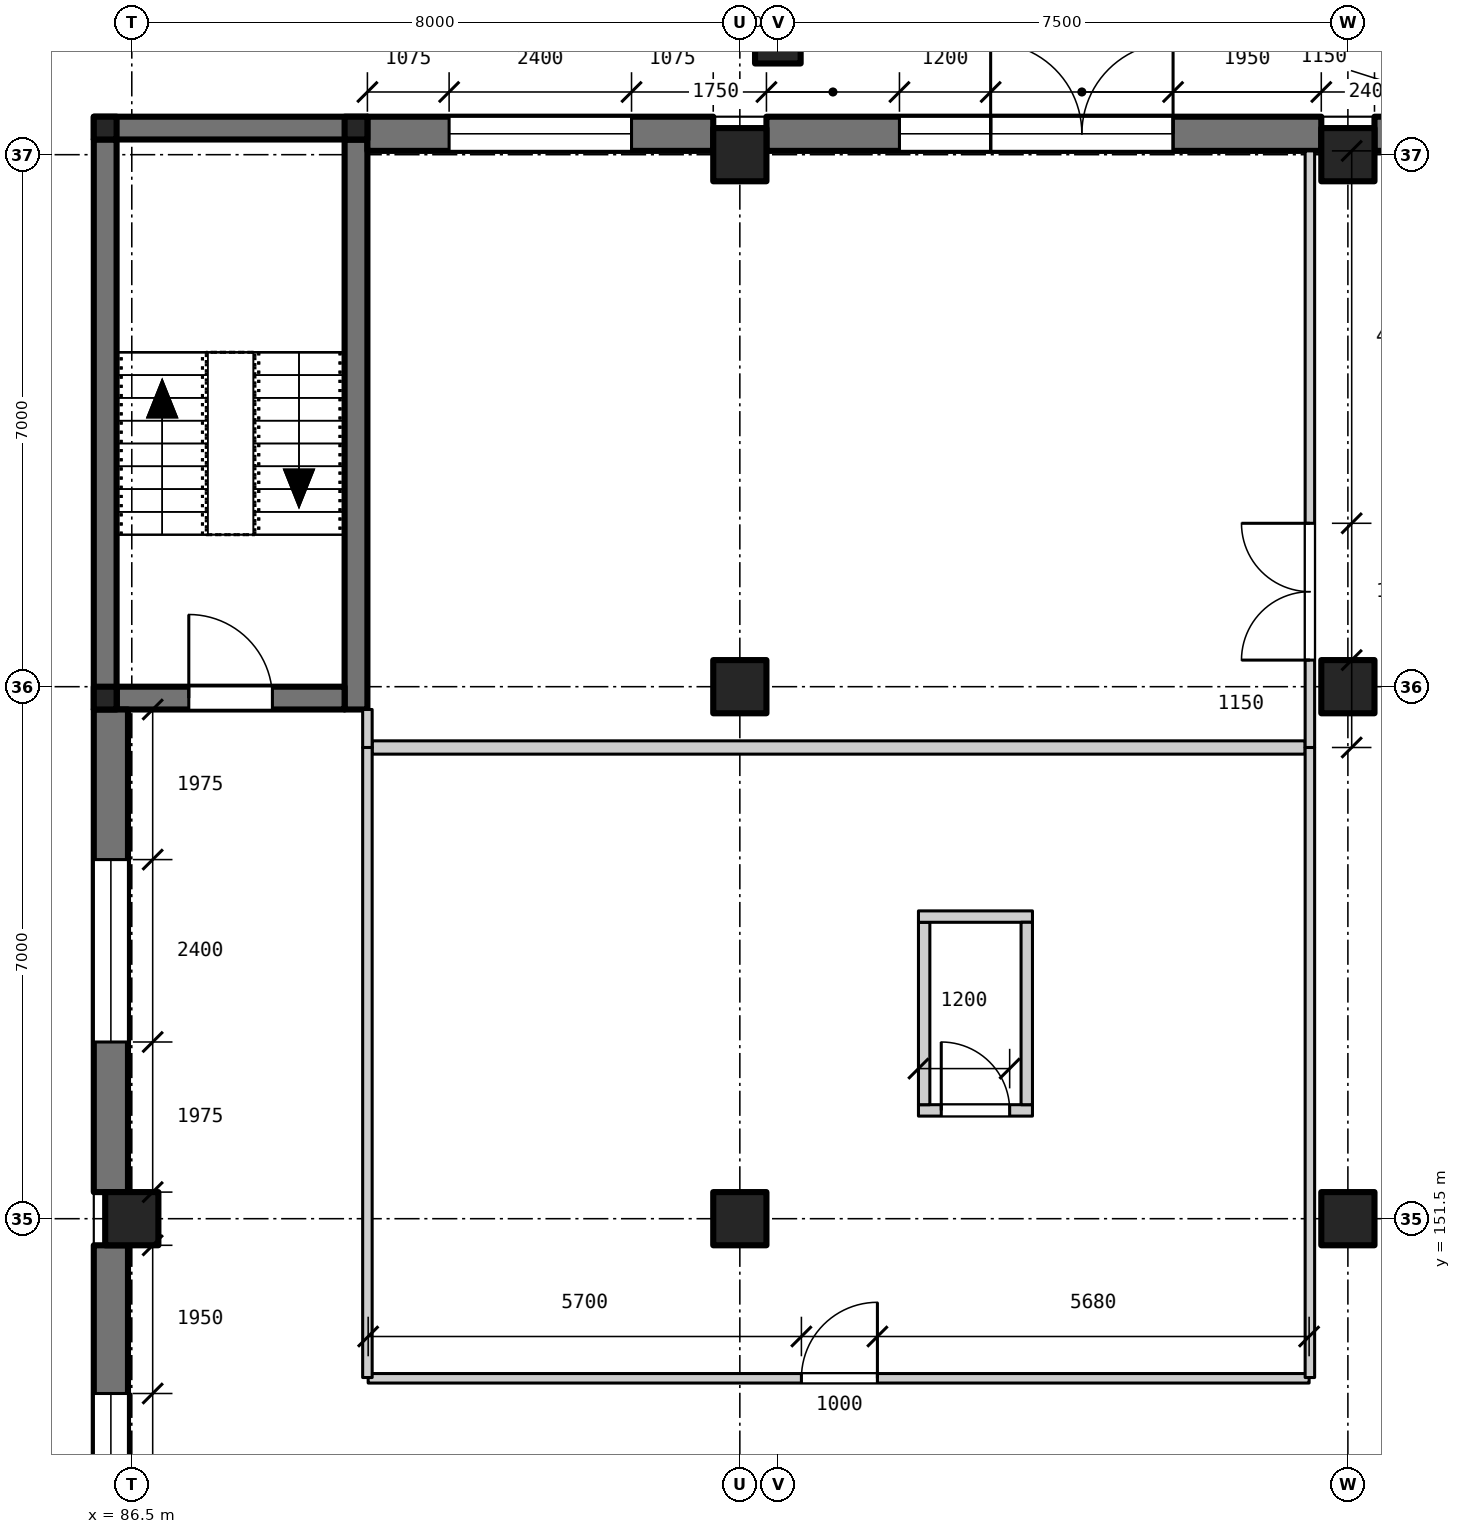
"""IFC4 building model, lengths in metres.
Left out: names, types, materials, properties, quantities, classifications, styles, units other than length and angle.
Written with IfcOpenShell. Run it as: python <this file> out.ifc"""

import sys

from ifc_helpers import new_model, si_unit, direction, frame, frame_2d, origin, origin_2d, place, context, subcontext, project, spatial, rectangle, extrude, element, fill, save


model = new_model("IFC4")
c1 = context("Model", 3, precision=1e-05, world=origin(), true_north=direction((0.0, 1.0)))
c2 = subcontext(c1, "Body", "Model", "MODEL_VIEW")
j1 = project(units=[si_unit("LENGTHUNIT", "METRE"), si_unit("PLANEANGLEUNIT", "RADIAN")], contexts=[c1])
p1 = place(None, origin())
s1 = spatial("IfcSite", under=j1, at=p1, CompositionType="ELEMENT")
p2 = place(p1, origin())
s2 = spatial("IfcBuilding", under=s1, at=p2, CompositionType="ELEMENT")
p3 = place(p2, origin())
s3 = spatial("IfcBuildingStorey", under=s2, at=p3, CompositionType="ELEMENT", Elevation=0.0)
for number, where, z_axis, x_axis in (
    (1, (86.5, 151.5, -1.4), (0.0, 0.0, 1.0), (1.0, 0.0, 0.0)),
    (2, (94.5, 151.5, -1.4), (0.0, 0.0, 1.0), (1.0, 0.0, 0.0)),
    (3, (94.5, 158.5, -1.4), (0.0, 0.0, 1.0), (1.0, 0.0, 0.0)),
    (4, (94.5, 165.5, -1.4), (0.0, 0.0, 1.0), (1.0, 0.0, 0.0)),
    (5, (102.5, 151.5, -1.4), (0.0, 0.0, 1.0), (1.0, 0.0, 0.0)),
    (6, (102.5, 158.5, -1.4), (0.0, 0.0, 1.0), (1.0, 0.0, 0.0)),
    (7, (102.5, 165.5, -1.4), (0.0, 0.0, 1.0), (1.0, 0.0, 0.0)),
):
    element("IfcColumn", number, at=place(p3, frame(where, z_axis=z_axis, x_axis=x_axis)), inside=s3, PredefinedType="COLUMN", context=c2, shape_type="SweptSolid", body=[
        extrude(rectangle(XDim=0.7, YDim=0.7, at=origin_2d()), origin(), (0.0, 0.0, 1.0), 7.4),
    ])
for number, where, z_axis, x_axis in (
    (8, (86.15, 158.35, -1.4), (0.0, 0.0, 1.0), (1.0, 0.0, 0.0)),
    (9, (86.15, 165.85, -1.4), (0.0, 0.0, 1.0), (1.0, 0.0, 0.0)),
    (10, (89.45, 165.85, -1.4), (0.0, 0.0, 1.0), (1.0, 0.0, 0.0)),
):
    element("IfcColumn", number, at=place(p3, frame(where, z_axis=z_axis, x_axis=x_axis)), inside=s3, PredefinedType="COLUMN", context=c2, shape_type="SweptSolid", body=[
        extrude(rectangle(XDim=0.3, YDim=0.3, at=origin_2d()), origin(), (0.0, 0.0, 1.0), 1.1),
    ])
p4 = place(p3, frame((95.0, 167.0, -0.3), z_axis=(0.0, 0.0, 1.0), x_axis=(1.0, 0.0, 0.0)))
e11 = element("IfcColumn", 11, at=p4, inside=s3, PredefinedType="COLUMN", context=c2, shape_type="SweptSolid", body=[
    extrude(rectangle(XDim=0.6, YDim=0.6, at=origin_2d()), origin(), (0.0, 0.0, 1.0), 6.15),
])
p5 = place(p3, frame((89.45, 158.2, -1.4), z_axis=(0.0, 0.0, 1.0), x_axis=(0.0, 1.0, 0.0)))
e12 = element("IfcWall", 12, at=p5, inside=s3, PredefinedType="SHEAR", context=c2, shape_type="SweptSolid", body=[
    extrude(rectangle(XDim=7.5, YDim=0.3, at=frame_2d((3.75, 0.0))), origin(), (0.0, 0.0, 1.0), 7.4),
])
p6 = place(p3, frame((86.3, 158.35, -1.4), z_axis=(0.0, 0.0, 1.0), x_axis=(1.0, 0.0, 0.0)))
e13 = element("IfcWall", 13, at=p6, inside=s3, PredefinedType="SHEAR", context=c2, shape_type="SweptSolid", body=[
    extrude(rectangle(XDim=3.0, YDim=0.3, at=frame_2d((1.5, 0.0))), origin(), (0.0, 0.0, 1.0), 7.4),
])
p7 = place(p6, frame((0.95, 0.0, 1.4)))
e14 = element("IfcOpeningElement", 14, at=p7, cuts=e13, PredefinedType="OPENING", context=c2, shape_type="SweptSolid", body=[
    extrude(rectangle(XDim=1.1, YDim=2.1, at=frame_2d((0.55, 1.05))), frame((0.0, 0.16, 0.0), z_axis=(0.0, -1.0, 0.0), x_axis=(1.0, 0.0, 0.0)), (0.0, 0.0, 1.0), 0.32),
])
p8 = place(p3, frame((86.0, 165.85, 0.0), z_axis=(0.0, 0.0, 1.0), x_axis=(1.0, 0.0, 0.0)))
e15 = element("IfcWall", 15, at=p8, inside=s3, PredefinedType="SOLIDWALL", context=c2, shape_type="SweptSolid", body=[
    extrude(rectangle(XDim=3.6, YDim=0.3, at=frame_2d((1.8, 0.0))), origin(), (0.0, 0.0, 1.0), 5.7),
])
p9 = place(p3, frame((89.6, 165.775, 0.0), z_axis=(0.0, 0.0, 1.0), x_axis=(1.0, 0.0, 0.0)))
e16 = element("IfcWall", 16, at=p9, inside=s3, PredefinedType="SOLIDWALL", context=c2, shape_type="SweptSolid", body=[
    extrude(rectangle(XDim=4.55, YDim=0.45, at=frame_2d((2.275, 0.0))), origin(), (0.0, 0.0, 1.0), 4.9),
])
p10 = place(p9, frame((1.075, 0.0, 0.9)))
e17 = element("IfcOpeningElement", 17, at=p10, cuts=e16, PredefinedType="OPENING", context=c2, shape_type="SweptSolid", body=[
    extrude(rectangle(XDim=2.4, YDim=1.6, at=frame_2d((1.2, 0.8))), frame((0.0, 0.235, 0.0), z_axis=(0.0, -1.0, 0.0), x_axis=(1.0, 0.0, 0.0)), (0.0, 0.0, 1.0), 0.47),
])
p11 = place(p3, frame((94.85, 165.775, 0.0), z_axis=(0.0, 0.0, 1.0), x_axis=(1.0, 0.0, 0.0)))
e18 = element("IfcWall", 18, at=p11, inside=s3, PredefinedType="SOLIDWALL", context=c2, shape_type="SweptSolid", body=[
    extrude(rectangle(XDim=7.3, YDim=0.45, at=frame_2d((3.65, 0.0))), origin(), (0.0, 0.0, 1.0), 4.9),
])
p12 = place(p11, frame((2.95, 0.0, 0.0)))
e19 = element("IfcOpeningElement", 19, at=p12, cuts=e18, PredefinedType="OPENING", context=c2, shape_type="SweptSolid", body=[
    extrude(rectangle(XDim=2.4, YDim=2.4, at=frame_2d((1.2, 1.2))), frame((0.0, 0.235, 0.0), z_axis=(0.0, -1.0, 0.0), x_axis=(1.0, 0.0, 0.0)), (0.0, 0.0, 1.0), 0.47),
])
p13 = place(p11, frame((2.95, 0.0, 2.5)))
e20 = element("IfcOpeningElement", 20, at=p13, cuts=e18, PredefinedType="OPENING", context=c2, shape_type="SweptSolid", body=[
    extrude(rectangle(XDim=2.4, YDim=0.6, at=frame_2d((1.2, 0.3))), frame((0.0, 0.235, 0.0), z_axis=(0.0, -1.0, 0.0), x_axis=(1.0, 0.0, 0.0)), (0.0, 0.0, 1.0), 0.47),
])
p14 = place(p11, frame((1.75, 0.0, 0.4)))
e21 = element("IfcOpeningElement", 21, at=p14, cuts=e18, PredefinedType="OPENING", context=c2, shape_type="SweptSolid", body=[
    extrude(rectangle(XDim=1.2, YDim=3.0, at=frame_2d((0.6, 1.5))), frame((0.0, 0.235, 0.0), z_axis=(0.0, -1.0, 0.0), x_axis=(1.0, 0.0, 0.0)), (0.0, 0.0, 1.0), 0.47),
])
p15 = place(p3, frame((102.85, 165.775, 0.0), z_axis=(0.0, 0.0, 1.0), x_axis=(1.0, 0.0, 0.0)))
e22 = element("IfcWall", 22, at=p15, inside=s3, PredefinedType="SOLIDWALL", context=c2, shape_type="SweptSolid", body=[
    extrude(rectangle(XDim=7.3, YDim=0.45, at=frame_2d((3.65, 0.0))), origin(), (0.0, 0.0, 1.0), 4.9),
])
p16 = place(p15, frame((4.525, 0.0, 0.0)))
e23 = element("IfcOpeningElement", 23, at=p16, cuts=e22, PredefinedType="OPENING", context=c2, shape_type="SweptSolid", body=[
    extrude(rectangle(XDim=2.4, YDim=2.4, at=frame_2d((1.2, 1.2))), frame((0.0, 0.235, 0.0), z_axis=(0.0, -1.0, 0.0), x_axis=(1.0, 0.0, 0.0)), (0.0, 0.0, 1.0), 0.47),
])
p17 = place(p15, frame((4.525, 0.0, 2.5)))
e24 = element("IfcOpeningElement", 24, at=p17, cuts=e22, PredefinedType="OPENING", context=c2, shape_type="SweptSolid", body=[
    extrude(rectangle(XDim=2.4, YDim=0.6, at=frame_2d((1.2, 0.3))), frame((0.0, 0.235, 0.0), z_axis=(0.0, -1.0, 0.0), x_axis=(1.0, 0.0, 0.0)), (0.0, 0.0, 1.0), 0.47),
])
p18 = place(p15, frame((3.325, 0.0, 0.4)))
e25 = element("IfcOpeningElement", 25, at=p18, cuts=e22, PredefinedType="OPENING", context=c2, shape_type="SweptSolid", body=[
    extrude(rectangle(XDim=1.2, YDim=3.0, at=frame_2d((0.6, 1.5))), frame((0.0, 0.235, 0.0), z_axis=(0.0, -1.0, 0.0), x_axis=(1.0, 0.0, 0.0)), (0.0, 0.0, 1.0), 0.47),
])
p19 = place(p3, frame((86.15, 158.2, 0.0), z_axis=(0.0, 0.0, 1.0), x_axis=(0.0, 1.0, 0.0)))
e26 = element("IfcWall", 26, at=p19, inside=s3, PredefinedType="SOLIDWALL", context=c2, shape_type="SweptSolid", body=[
    extrude(rectangle(XDim=7.5, YDim=0.3, at=frame_2d((3.75, 0.0))), origin(), (0.0, 0.0, 1.0), 5.7),
])
p20 = place(p3, frame((86.225, 144.85, 0.0), z_axis=(0.0, 0.0, 1.0), x_axis=(0.0, 1.0, 0.0)))
e27 = element("IfcWall", 27, at=p20, inside=s3, PredefinedType="SOLIDWALL", context=c2, shape_type="SweptSolid", body=[
    extrude(rectangle(XDim=6.3, YDim=0.45, at=frame_2d((3.15, 0.0))), origin(), (0.0, 0.0, 1.0), 5.0),
])
p21 = place(p20, frame((1.95, 0.0, 0.9)))
e28 = element("IfcOpeningElement", 28, at=p21, cuts=e27, PredefinedType="OPENING", context=c2, shape_type="SweptSolid", body=[
    extrude(rectangle(XDim=2.4, YDim=1.6, at=frame_2d((1.2, 0.8))), frame((0.0, 0.235, 0.0), z_axis=(0.0, -1.0, 0.0), x_axis=(1.0, 0.0, 0.0)), (0.0, 0.0, 1.0), 0.47),
])
p22 = place(p3, frame((86.225, 151.85, 0.0), z_axis=(0.0, 0.0, 1.0), x_axis=(0.0, 1.0, 0.0)))
e29 = element("IfcWall", 29, at=p22, inside=s3, PredefinedType="SOLIDWALL", context=c2, shape_type="SweptSolid", body=[
    extrude(rectangle(XDim=6.35, YDim=0.45, at=frame_2d((3.175, 0.0))), origin(), (0.0, 0.0, 1.0), 5.0),
])
p23 = place(p22, frame((1.975, 0.0, 0.9)))
e30 = element("IfcOpeningElement", 30, at=p23, cuts=e29, PredefinedType="OPENING", context=c2, shape_type="SweptSolid", body=[
    extrude(rectangle(XDim=2.4, YDim=1.6, at=frame_2d((1.2, 0.8))), frame((0.0, 0.235, 0.0), z_axis=(0.0, -1.0, 0.0), x_axis=(1.0, 0.0, 0.0)), (0.0, 0.0, 1.0), 0.47),
])
p24 = place(p3, frame((96.85, 152.925, 0.0), z_axis=(0.0, 0.0, 1.0), x_axis=(1.0, 0.0, 0.0)))
e31 = element("IfcWall", 31, at=p24, inside=s3, PredefinedType="PARTITIONING", context=c2, shape_type="SweptSolid", body=[
    extrude(rectangle(XDim=1.5, YDim=0.15, at=frame_2d((0.75, 0.0))), origin(), (0.0, 0.0, 1.0), 5.7),
])
p25 = place(p24, frame((0.3, 0.0, 0.0)))
e32 = element("IfcOpeningElement", 32, at=p25, cuts=e31, PredefinedType="OPENING", context=c2, shape_type="SweptSolid", body=[
    extrude(rectangle(XDim=0.9, YDim=2.1, at=frame_2d((0.45, 1.05))), frame((0.0, 0.085, 0.0), z_axis=(0.0, -1.0, 0.0), x_axis=(1.0, 0.0, 0.0)), (0.0, 0.0, 1.0), 0.17),
])
p26 = place(p3, frame((96.925, 153.0, 0.0), z_axis=(0.0, 0.0, 1.0), x_axis=(0.0, 1.0, 0.0)))
e33 = element("IfcWall", 33, at=p26, inside=s3, PredefinedType="PARTITIONING", context=c2, shape_type="SweptSolid", body=[
    extrude(rectangle(XDim=2.4, YDim=0.15, at=frame_2d((1.2, 0.0))), origin(), (0.0, 0.0, 1.0), 5.7),
])
p27 = place(p3, frame((96.85, 155.475, 0.0), z_axis=(0.0, 0.0, 1.0), x_axis=(1.0, 0.0, 0.0)))
e34 = element("IfcWall", 34, at=p27, inside=s3, PredefinedType="PARTITIONING", context=c2, shape_type="SweptSolid", body=[
    extrude(rectangle(XDim=1.5, YDim=0.15, at=frame_2d((0.75, 0.0))), origin(), (0.0, 0.0, 1.0), 5.7),
])
p28 = place(p3, frame((98.275, 153.0, 0.0), z_axis=(0.0, 0.0, 1.0), x_axis=(0.0, 1.0, 0.0)))
e35 = element("IfcWall", 35, at=p28, inside=s3, PredefinedType="PARTITIONING", context=c2, shape_type="SweptSolid", body=[
    extrude(rectangle(XDim=2.4, YDim=0.15, at=frame_2d((1.2, 0.0))), origin(), (0.0, 0.0, 1.0), 5.7),
])
p29 = place(p3, frame((89.61, 149.4, 0.0), z_axis=(0.0, 0.0, 1.0), x_axis=(1.0, 0.0, 0.0)))
e36 = element("IfcWall", 36, at=p29, inside=s3, PredefinedType="PARTITIONING", context=c2, shape_type="SweptSolid", body=[
    extrude(rectangle(XDim=12.38, YDim=0.125, at=frame_2d((6.19, 0.0))), origin(), (0.0, 0.0, 1.0), 5.7),
])
p30 = place(p29, frame((5.7, 0.0, 0.0)))
e37 = element("IfcOpeningElement", 37, at=p30, cuts=e36, PredefinedType="OPENING", context=c2, shape_type="SweptSolid", body=[
    extrude(rectangle(XDim=1.0, YDim=2.1, at=frame_2d((0.5, 1.05))), frame((0.0, 0.073, 0.0), z_axis=(0.0, -1.0, 0.0), x_axis=(1.0, 0.0, 0.0)), (0.0, 0.0, 1.0), 0.145),
])
p31 = place(p3, frame((89.663, 157.7, 0.0), z_axis=(0.0, 0.0, 1.0), x_axis=(1.0, 0.0, 0.0)))
e38 = element("IfcWall", 38, at=p31, inside=s3, PredefinedType="PARTITIONING", context=c2, shape_type="SweptSolid", body=[
    extrude(rectangle(XDim=12.275, YDim=0.175, at=frame_2d((6.137, 0.0))), origin(), (0.0, 0.0, 1.0), 5.7),
])
p32 = place(p3, frame((89.6, 149.41, 0.0), z_axis=(0.0, 0.0, 1.0), x_axis=(0.0, 1.0, 0.0)))
e39 = element("IfcWall", 39, at=p32, inside=s3, PredefinedType="PARTITIONING", context=c2, shape_type="SweptSolid", body=[
    extrude(rectangle(XDim=8.29, YDim=0.125, at=frame_2d((4.145, 0.0))), origin(), (0.0, 0.0, 1.0), 5.7),
])
p33 = place(p3, frame((89.6, 157.7, 0.0), z_axis=(0.0, 0.0, 1.0), x_axis=(0.0, 1.0, 0.0)))
e40 = element("IfcWall", 40, at=p33, inside=s3, PredefinedType="PARTITIONING", context=c2, shape_type="SweptSolid", body=[
    extrude(rectangle(XDim=0.5, YDim=0.125, at=frame_2d((0.25, 0.0))), origin(), (0.0, 0.0, 1.0), 5.7),
])
p34 = place(p3, frame((102.0, 149.41, 0.0), z_axis=(0.0, 0.0, 1.0), x_axis=(0.0, 1.0, 0.0)))
e41 = element("IfcWall", 41, at=p34, inside=s3, PredefinedType="PARTITIONING", context=c2, shape_type="SweptSolid", body=[
    extrude(rectangle(XDim=8.29, YDim=0.125, at=frame_2d((4.145, 0.0))), origin(), (0.0, 0.0, 1.0), 5.7),
])
p35 = place(p3, frame((102.0, 157.7, 0.0), z_axis=(0.0, 0.0, 1.0), x_axis=(0.0, 1.0, 0.0)))
e42 = element("IfcWall", 42, at=p35, inside=s3, PredefinedType="PARTITIONING", context=c2, shape_type="SweptSolid", body=[
    extrude(rectangle(XDim=7.85, YDim=0.125, at=frame_2d((3.925, 0.0))), origin(), (0.0, 0.0, 1.0), 5.7),
])
p36 = place(p35, frame((1.15, 0.0, 0.0)))
e43 = element("IfcOpeningElement", 43, at=p36, cuts=e42, PredefinedType="OPENING", context=c2, shape_type="SweptSolid", body=[
    extrude(rectangle(XDim=1.8, YDim=2.1, at=frame_2d((0.9, 1.05))), frame((0.0, 0.073, 0.0), z_axis=(0.0, -1.0, 0.0), x_axis=(1.0, 0.0, 0.0)), (0.0, 0.0, 1.0), 0.145),
])
p37 = place(p10, origin())
e44 = element("IfcWindow", 44, at=p37, inside=s3, PartitioningType="SINGLE_PANEL", PredefinedType="WINDOW", context=c2, shape_type="SweptSolid", body=[
    extrude(rectangle(XDim=2.4, YDim=1.6, at=frame_2d((1.2, 0.8))), frame((0.0, -0.125, 0.0), z_axis=(0.0, -1.0, 0.0), x_axis=(1.0, 0.0, 0.0)), (0.0, 0.0, 1.0), 0.06),
])
fill(e17, e44)
p38 = place(p12, origin())
e45 = element("IfcDoor", 45, at=p38, inside=s3, OperationType="DOUBLE_DOOR_DOUBLE_SWING", PredefinedType="DOOR", context=c2, shape_type="SweptSolid", body=[
    extrude(rectangle(XDim=2.4, YDim=2.4, at=frame_2d((1.2, 1.2))), frame((0.0, 0.025, 0.0), z_axis=(0.0, -1.0, 0.0), x_axis=(1.0, 0.0, 0.0)), (0.0, 0.0, 1.0), 0.05),
])
fill(e19, e45)
p39 = place(p13, origin())
e46 = element("IfcWindow", 46, at=p39, inside=s3, PartitioningType="SINGLE_PANEL", PredefinedType="WINDOW", context=c2, shape_type="SweptSolid", body=[
    extrude(rectangle(XDim=2.4, YDim=0.6, at=frame_2d((1.2, 0.3))), frame((0.0, 0.025, 0.0), z_axis=(0.0, -1.0, 0.0), x_axis=(1.0, 0.0, 0.0)), (0.0, 0.0, 1.0), 0.06),
])
fill(e20, e46)
p40 = place(p14, origin())
e47 = element("IfcWindow", 47, at=p40, inside=s3, PartitioningType="SINGLE_PANEL", PredefinedType="WINDOW", context=c2, shape_type="SweptSolid", body=[
    extrude(rectangle(XDim=1.2, YDim=3.0, at=frame_2d((0.6, 1.5))), frame((0.0, 0.025, 0.0), z_axis=(0.0, -1.0, 0.0), x_axis=(1.0, 0.0, 0.0)), (0.0, 0.0, 1.0), 0.06),
])
fill(e21, e47)
p41 = place(p21, origin())
e48 = element("IfcWindow", 48, at=p41, inside=s3, PartitioningType="SINGLE_PANEL", PredefinedType="WINDOW", context=c2, shape_type="SweptSolid", body=[
    extrude(rectangle(XDim=2.4, YDim=1.6, at=frame_2d((1.2, 0.8))), frame((0.0, -0.125, 0.0), z_axis=(0.0, -1.0, 0.0), x_axis=(1.0, 0.0, 0.0)), (0.0, 0.0, 1.0), 0.06),
])
fill(e28, e48)
p42 = place(p23, origin())
e49 = element("IfcWindow", 49, at=p42, inside=s3, PartitioningType="SINGLE_PANEL", PredefinedType="WINDOW", context=c2, shape_type="SweptSolid", body=[
    extrude(rectangle(XDim=2.4, YDim=1.6, at=frame_2d((1.2, 0.8))), frame((0.0, -0.125, 0.0), z_axis=(0.0, -1.0, 0.0), x_axis=(1.0, 0.0, 0.0)), (0.0, 0.0, 1.0), 0.06),
])
fill(e30, e49)
p43 = place(p30, origin())
e50 = element("IfcDoor", 50, at=p43, inside=s3, OperationType="SINGLE_SWING_RIGHT", PredefinedType="DOOR", context=c2, shape_type="SweptSolid", body=[
    extrude(rectangle(XDim=1.0, YDim=2.1, at=frame_2d((0.5, 1.05))), frame((0.0, 0.025, 0.0), z_axis=(0.0, -1.0, 0.0), x_axis=(1.0, 0.0, 0.0)), (0.0, 0.0, 1.0), 0.05),
])
fill(e37, e50)
p44 = place(p25, origin())
e51 = element("IfcDoor", 51, at=p44, inside=s3, OperationType="SINGLE_SWING_LEFT", PredefinedType="DOOR", context=c2, shape_type="SweptSolid", body=[
    extrude(rectangle(XDim=0.9, YDim=2.1, at=frame_2d((0.45, 1.05))), frame((0.0, 0.025, 0.0), z_axis=(0.0, -1.0, 0.0), x_axis=(1.0, 0.0, 0.0)), (0.0, 0.0, 1.0), 0.05),
])
fill(e32, e51)
p45 = place(p36, origin())
e52 = element("IfcDoor", 52, at=p45, inside=s3, OperationType="DOUBLE_DOOR_SINGLE_SWING", PredefinedType="DOOR", context=c2, shape_type="SweptSolid", body=[
    extrude(rectangle(XDim=1.8, YDim=2.1, at=frame_2d((0.9, 1.05))), frame((0.0, 0.025, 0.0), z_axis=(0.0, -1.0, 0.0), x_axis=(1.0, 0.0, 0.0)), (0.0, 0.0, 1.0), 0.05),
])
fill(e43, e52)
p46 = place(p7, origin())
e53 = element("IfcDoor", 53, at=p46, inside=s3, OperationType="SINGLE_SWING_LEFT", PredefinedType="DOOR", context=c2, shape_type="SweptSolid", body=[
    extrude(rectangle(XDim=1.1, YDim=2.1, at=frame_2d((0.55, 1.05))), frame((0.0, 0.025, 0.0), z_axis=(0.0, -1.0, 0.0), x_axis=(1.0, 0.0, 0.0)), (0.0, 0.0, 1.0), 0.05),
])
fill(e14, e53)
save(model, sys.argv[1])
